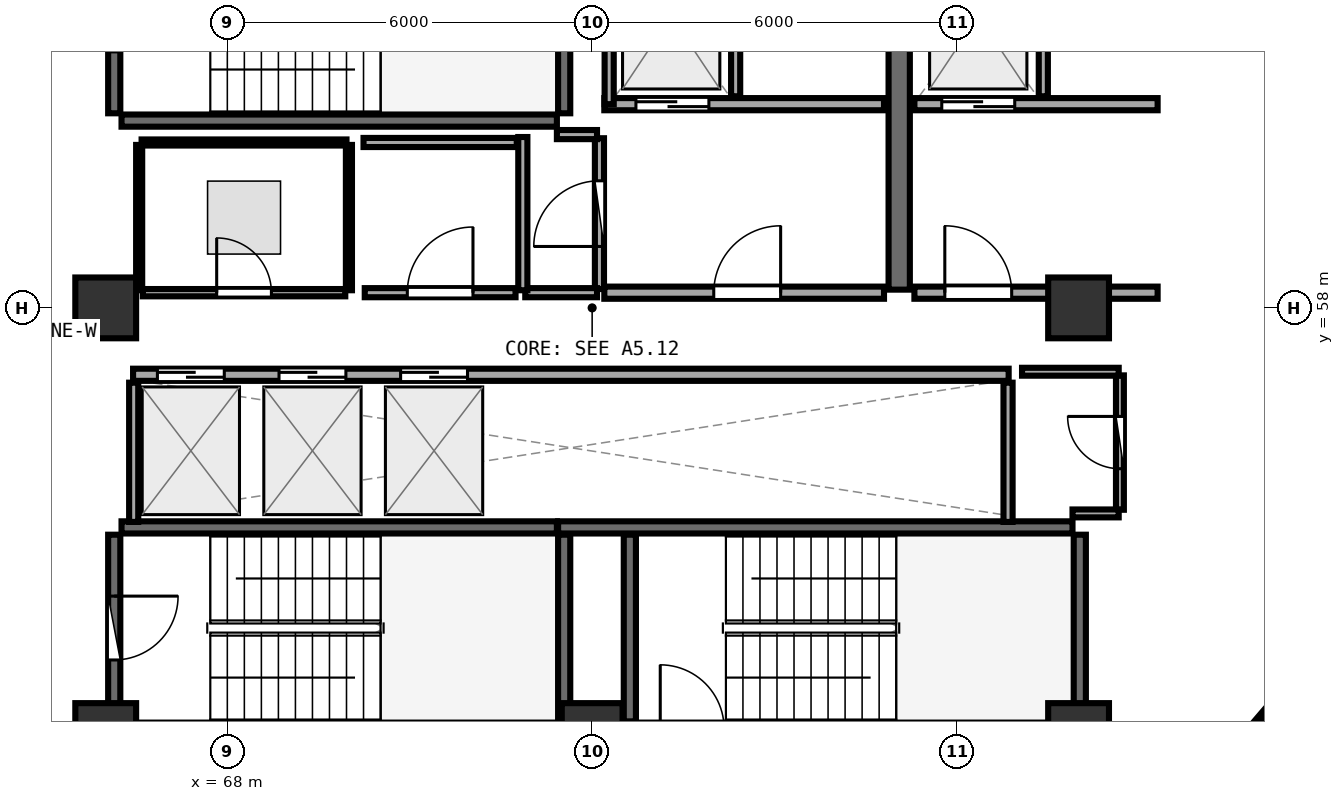
"""IFC4 building model, lengths in metres.
Left out: names, types, materials, properties, quantities, classifications, styles, units other than length and angle.
Written with IfcOpenShell. Run it as: python <this file> out.ifc"""

import sys

from ifc_helpers import new_model, si_unit, direction, frame, frame_2d, origin, origin_2d, place, context, subcontext, project, spatial, rectangle, extrude, element, fill, save


model = new_model("IFC4")
c1 = context("Model", 3, precision=1e-05, world=origin(), true_north=direction((0.0, 1.0)))
c2 = subcontext(c1, "Body", "Model", "MODEL_VIEW")
j1 = project(units=[si_unit("LENGTHUNIT", "METRE"), si_unit("PLANEANGLEUNIT", "RADIAN")], contexts=[c1])
p1 = place(None, origin())
s1 = spatial("IfcSite", under=j1, at=p1, CompositionType="ELEMENT")
p2 = place(p1, origin())
s2 = spatial("IfcBuilding", under=s1, at=p2, CompositionType="ELEMENT")
p3 = place(p2, frame((0.0, 0.0, 230.7)))
s3 = spatial("IfcBuildingStorey", under=s2, at=p3, CompositionType="ELEMENT", Elevation=230.7)
for number, where, z_axis, x_axis in (
    (1, (66.0, 51.0, 0.0), (0.0, 0.0, 1.0), (1.0, 0.0, 0.0)),
    (2, (74.0, 51.0, 0.0), (0.0, 0.0, 1.0), (1.0, 0.0, 0.0)),
    (3, (82.0, 51.0, 0.0), (0.0, 0.0, 1.0), (1.0, 0.0, 0.0)),
    (4, (82.0, 58.0, 0.0), (0.0, 0.0, 1.0), (1.0, 0.0, 0.0)),
    (5, (66.0, 58.0, 0.0), (0.0, 0.0, 1.0), (1.0, 0.0, 0.0)),
):
    element("IfcColumn", number, at=place(p3, frame(where, z_axis=z_axis, x_axis=x_axis)), inside=s3, PredefinedType="PILASTER", context=c2, shape_type="SweptSolid", body=[
        extrude(rectangle(XDim=1.0, YDim=1.0, at=origin_2d()), origin(), (0.0, 0.0, 1.0), 3.75),
    ])
p4 = place(p3, frame((66.26, 61.08, 0.0), z_axis=(0.0, 0.0, 1.0), x_axis=(1.0, 0.0, 0.0)))
e6 = element("IfcWall", 6, at=p4, inside=s3, PredefinedType="SHEAR", context=c2, shape_type="SweptSolid", body=[
    extrude(rectangle(XDim=7.16, YDim=0.2, at=frame_2d((3.58, 0.0))), origin(), (0.0, 0.0, 1.0), 3.49),
])
p5 = place(p3, frame((73.54, 61.2, 0.0), z_axis=(0.0, 0.0, 1.0), x_axis=(0.0, 1.0, 0.0)))
e7 = element("IfcWall", 7, at=p5, inside=s3, PredefinedType="SHEAR", context=c2, shape_type="SweptSolid", body=[
    extrude(rectangle(XDim=3.07, YDim=0.2, at=frame_2d((1.535, 0.0))), origin(), (0.0, 0.0, 1.0), 3.49),
])
p6 = place(p3, frame((66.14, 64.27, 0.0), z_axis=(0.0, 0.0, 1.0), x_axis=(0.0, -1.0, 0.0)))
e8 = element("IfcWall", 8, at=p6, inside=s3, PredefinedType="SHEAR", context=c2, shape_type="SweptSolid", body=[
    extrude(rectangle(XDim=3.07, YDim=0.2, at=frame_2d((1.535, 0.0))), origin(), (0.0, 0.0, 1.0), 3.49),
])
p7 = place(p6, frame((1.01, 0.0, 0.0)))
e9 = element("IfcOpeningElement", 9, at=p7, cuts=e8, PredefinedType="OPENING", context=c2, shape_type="SweptSolid", body=[
    extrude(rectangle(XDim=1.05, YDim=2.1, at=frame_2d((0.525, 1.05))), frame((0.0, 0.11, 0.0), z_axis=(0.0, -1.0, 0.0), x_axis=(1.0, 0.0, 0.0)), (0.0, 0.0, 1.0), 0.22),
])
p8 = place(p3, frame((82.02, 51.2, 0.0), z_axis=(0.0, 0.0, 1.0), x_axis=(0.0, 1.0, 0.0)))
e10 = element("IfcWall", 10, at=p8, inside=s3, PredefinedType="SHEAR", context=c2, shape_type="SweptSolid", body=[
    extrude(rectangle(XDim=3.07, YDim=0.2, at=frame_2d((1.535, 0.0))), origin(), (0.0, 0.0, 1.0), 3.49),
])
p9 = place(p3, frame((81.9, 54.39, 0.0), z_axis=(0.0, 0.0, 1.0), x_axis=(-1.0, 0.0, 0.0)))
e11 = element("IfcWall", 11, at=p9, inside=s3, PredefinedType="SHEAR", context=c2, shape_type="SweptSolid", body=[
    extrude(rectangle(XDim=8.46, YDim=0.2, at=frame_2d((4.23, 0.0))), origin(), (0.0, 0.0, 1.0), 3.49),
])
for number, where, z_axis, x_axis in (
    (12, (74.62, 54.27, 0.0), (0.0, 0.0, 1.0), (0.0, -1.0, 0.0)),
    (13, (73.54, 51.2, 0.0), (0.0, 0.0, 1.0), (0.0, 1.0, 0.0)),
):
    element("IfcWall", number, at=place(p3, frame(where, z_axis=z_axis, x_axis=x_axis)), inside=s3, PredefinedType="SHEAR", context=c2, shape_type="SweptSolid", body=[
        extrude(rectangle(XDim=3.07, YDim=0.2, at=frame_2d((1.535, 0.0))), origin(), (0.0, 0.0, 1.0), 3.49),
    ])
p10 = place(p3, frame((73.42, 54.39, 0.0), z_axis=(0.0, 0.0, 1.0), x_axis=(-1.0, 0.0, 0.0)))
e14 = element("IfcWall", 14, at=p10, inside=s3, PredefinedType="SHEAR", context=c2, shape_type="SweptSolid", body=[
    extrude(rectangle(XDim=7.16, YDim=0.2, at=frame_2d((3.58, 0.0))), origin(), (0.0, 0.0, 1.0), 3.49),
])
p11 = place(p3, frame((66.14, 54.27, 0.0), z_axis=(0.0, 0.0, 1.0), x_axis=(0.0, -1.0, 0.0)))
e15 = element("IfcWall", 15, at=p11, inside=s3, PredefinedType="SHEAR", context=c2, shape_type="SweptSolid", body=[
    extrude(rectangle(XDim=3.07, YDim=0.2, at=frame_2d((1.535, 0.0))), origin(), (0.0, 0.0, 1.0), 3.49),
])
p12 = place(p11, frame((1.01, 0.0, 0.0)))
e16 = element("IfcOpeningElement", 16, at=p12, cuts=e15, PredefinedType="OPENING", context=c2, shape_type="SweptSolid", body=[
    extrude(rectangle(XDim=1.05, YDim=2.1, at=frame_2d((0.525, 1.05))), frame((0.0, 0.11, 0.0), z_axis=(0.0, -1.0, 0.0), x_axis=(1.0, 0.0, 0.0)), (0.0, 0.0, 1.0), 0.22),
])
p13 = place(p3, frame((79.05, 58.3, 0.0), z_axis=(0.0, 0.0, 1.0), x_axis=(0.0, 1.0, 0.0)))
e17 = element("IfcWall", 17, at=p13, inside=s3, PredefinedType="SHEAR", context=c2, shape_type="SweptSolid", body=[
    extrude(rectangle(XDim=6.3, YDim=0.35, at=frame_2d((3.15, 0.0))), origin(), (0.0, 0.0, 1.0), 3.49),
])
p14 = place(p3, frame((74.2, 61.35, 0.0), z_axis=(0.0, 0.0, 1.0), x_axis=(1.0, 0.0, 0.0)))
e18 = element("IfcWall", 18, at=p14, inside=s3, PredefinedType="SOLIDWALL", context=c2, shape_type="SweptSolid", body=[
    extrude(rectangle(XDim=4.6, YDim=0.2, at=frame_2d((2.3, 0.0))), origin(), (0.0, 0.0, 1.0), 3.48),
])
p15 = place(p14, frame((0.52, 0.0, 0.0)))
e19 = element("IfcOpeningElement", 19, at=p15, cuts=e18, PredefinedType="OPENING", context=c2, shape_type="SweptSolid", body=[
    extrude(rectangle(XDim=1.2, YDim=2.15, at=frame_2d((0.6, 1.075))), frame((0.0, 0.11, 0.0), z_axis=(0.0, -1.0, 0.0), x_axis=(1.0, 0.0, 0.0)), (0.0, 0.0, 1.0), 0.22),
])
p16 = place(p3, frame((74.28, 61.35, 0.0), z_axis=(0.0, 0.0, 1.0), x_axis=(0.0, 1.0, 0.0)))
e20 = element("IfcWall", 20, at=p16, inside=s3, PredefinedType="PARTITIONING", context=c2, shape_type="SweptSolid", body=[
    extrude(rectangle(XDim=2.97, YDim=0.15, at=frame_2d((1.485, 0.0))), origin(), (0.0, 0.0, 1.0), 3.48),
])
p17 = place(p3, frame((76.36, 61.48, 0.0), z_axis=(0.0, 0.0, 1.0), x_axis=(0.0, 1.0, 0.0)))
e21 = element("IfcWall", 21, at=p17, inside=s3, PredefinedType="PARTITIONING", context=c2, shape_type="SweptSolid", body=[
    extrude(rectangle(XDim=2.84, YDim=0.15, at=frame_2d((1.42, 0.0))), origin(), (0.0, 0.0, 1.0), 3.48),
])
p18 = place(p3, frame((79.3, 61.35, 0.0), z_axis=(0.0, 0.0, 1.0), x_axis=(1.0, 0.0, 0.0)))
e22 = element("IfcWall", 22, at=p18, inside=s3, PredefinedType="SOLIDWALL", context=c2, shape_type="SweptSolid", body=[
    extrude(rectangle(XDim=4.0, YDim=0.2, at=frame_2d((2.0, 0.0))), origin(), (0.0, 0.0, 1.0), 2.775),
])
p19 = place(p18, frame((0.45, 0.0, 0.0)))
e23 = element("IfcOpeningElement", 23, at=p19, cuts=e22, PredefinedType="OPENING", context=c2, shape_type="SweptSolid", body=[
    extrude(rectangle(XDim=1.2, YDim=2.15, at=frame_2d((0.6, 1.075))), frame((0.0, 0.11, 0.0), z_axis=(0.0, -1.0, 0.0), x_axis=(1.0, 0.0, 0.0)), (0.0, 0.0, 1.0), 0.22),
])
p20 = place(p3, frame((81.42, 61.48, 0.0), z_axis=(0.0, 0.0, 1.0), x_axis=(0.0, 1.0, 0.0)))
e24 = element("IfcWall", 24, at=p20, inside=s3, PredefinedType="PARTITIONING", context=c2, shape_type="SweptSolid", body=[
    extrude(rectangle(XDim=2.84, YDim=0.15, at=frame_2d((1.42, 0.0))), origin(), (0.0, 0.0, 1.0), 3.48),
])
p21 = place(p3, frame((74.2, 58.25, 0.0), z_axis=(0.0, 0.0, 1.0), x_axis=(1.0, 0.0, 0.0)))
e25 = element("IfcWall", 25, at=p21, inside=s3, PredefinedType="SOLIDWALL", context=c2, shape_type="SweptSolid", body=[
    extrude(rectangle(XDim=4.6, YDim=0.2, at=frame_2d((2.3, 0.0))), origin(), (0.0, 0.0, 1.0), 3.48),
])
p22 = place(p21, frame((1.8, 0.0, 0.0)))
e26 = element("IfcOpeningElement", 26, at=p22, cuts=e25, PredefinedType="OPENING", context=c2, shape_type="SweptSolid", body=[
    extrude(rectangle(XDim=1.1, YDim=2.1, at=frame_2d((0.55, 1.05))), frame((0.0, 0.11, 0.0), z_axis=(0.0, -1.0, 0.0), x_axis=(1.0, 0.0, 0.0)), (0.0, 0.0, 1.0), 0.22),
])
p23 = place(p3, frame((79.3, 58.25, 0.0), z_axis=(0.0, 0.0, 1.0), x_axis=(1.0, 0.0, 0.0)))
e27 = element("IfcWall", 27, at=p23, inside=s3, PredefinedType="SOLIDWALL", context=c2, shape_type="SweptSolid", body=[
    extrude(rectangle(XDim=4.0, YDim=0.2, at=frame_2d((2.0, 0.0))), origin(), (0.0, 0.0, 1.0), 2.775),
])
p24 = place(p23, frame((0.5, 0.0, 0.0)))
e28 = element("IfcOpeningElement", 28, at=p24, cuts=e27, PredefinedType="OPENING", context=c2, shape_type="SweptSolid", body=[
    extrude(rectangle(XDim=1.1, YDim=2.1, at=frame_2d((0.55, 1.05))), frame((0.0, 0.11, 0.0), z_axis=(0.0, -1.0, 0.0), x_axis=(1.0, 0.0, 0.0)), (0.0, 0.0, 1.0), 0.22),
])
p25 = place(p3, frame((66.45, 56.9, 0.0), z_axis=(0.0, 0.0, 1.0), x_axis=(1.0, 0.0, 0.0)))
e29 = element("IfcWall", 29, at=p25, inside=s3, PredefinedType="SOLIDWALL", context=c2, shape_type="SweptSolid", body=[
    extrude(rectangle(XDim=14.4, YDim=0.2, at=frame_2d((7.2, 0.0))), origin(), (0.0, 0.0, 1.0), 3.48),
])
p26 = place(p25, frame((0.4, 0.0, 0.0)))
e30 = element("IfcOpeningElement", 30, at=p26, cuts=e29, PredefinedType="OPENING", context=c2, shape_type="SweptSolid", body=[
    extrude(rectangle(XDim=1.1, YDim=2.1, at=frame_2d((0.55, 1.05))), frame((0.0, 0.11, 0.0), z_axis=(0.0, -1.0, 0.0), x_axis=(1.0, 0.0, 0.0)), (0.0, 0.0, 1.0), 0.22),
])
p27 = place(p25, frame((2.4, 0.0, 0.0)))
e31 = element("IfcOpeningElement", 31, at=p27, cuts=e29, PredefinedType="OPENING", context=c2, shape_type="SweptSolid", body=[
    extrude(rectangle(XDim=1.1, YDim=2.1, at=frame_2d((0.55, 1.05))), frame((0.0, 0.11, 0.0), z_axis=(0.0, -1.0, 0.0), x_axis=(1.0, 0.0, 0.0)), (0.0, 0.0, 1.0), 0.22),
])
p28 = place(p25, frame((4.4, 0.0, 0.0)))
e32 = element("IfcOpeningElement", 32, at=p28, cuts=e29, PredefinedType="OPENING", context=c2, shape_type="SweptSolid", body=[
    extrude(rectangle(XDim=1.1, YDim=2.1, at=frame_2d((0.55, 1.05))), frame((0.0, 0.11, 0.0), z_axis=(0.0, -1.0, 0.0), x_axis=(1.0, 0.0, 0.0)), (0.0, 0.0, 1.0), 0.22),
])
for number, where, z_axis, x_axis in (
    (33, (66.46, 54.48, 0.0), (0.0, 0.0, 1.0), (0.0, 1.0, 0.0)),
    (34, (80.84, 54.48, 0.0), (0.0, 0.0, 1.0), (0.0, 1.0, 0.0)),
):
    element("IfcWall", number, at=place(p3, frame(where, z_axis=z_axis, x_axis=x_axis)), inside=s3, PredefinedType="PARTITIONING", context=c2, shape_type="SweptSolid", body=[
        extrude(rectangle(XDim=2.29, YDim=0.15, at=frame_2d((1.145, 0.0))), origin(), (0.0, 0.0, 1.0), 3.48),
    ])
p29 = place(p3, frame((74.12, 58.31, 0.0), z_axis=(0.0, 0.0, 1.0), x_axis=(0.0, 1.0, 0.0)))
e35 = element("IfcWall", 35, at=p29, inside=s3, PredefinedType="PARTITIONING", context=c2, shape_type="SweptSolid", body=[
    extrude(rectangle(XDim=2.48, YDim=0.15, at=frame_2d((1.24, 0.0))), origin(), (0.0, 0.0, 1.0), 3.48),
])
p30 = place(p29, frame((0.7, 0.0, 0.0)))
e36 = element("IfcOpeningElement", 36, at=p30, cuts=e35, PredefinedType="OPENING", context=c2, shape_type="SweptSolid", body=[
    extrude(rectangle(XDim=1.08, YDim=2.1, at=frame_2d((0.54, 1.05))), frame((0.0, 0.085, 0.0), z_axis=(0.0, -1.0, 0.0), x_axis=(1.0, 0.0, 0.0)), (0.0, 0.0, 1.0), 0.17),
])
p31 = place(p3, frame((82.68, 54.68, 0.0), z_axis=(0.0, 0.0, 1.0), x_axis=(0.0, 1.0, 0.0)))
e37 = element("IfcWall", 37, at=p31, inside=s3, PredefinedType="PLUMBINGWALL", context=c2, shape_type="SweptSolid", body=[
    extrude(rectangle(XDim=2.21, YDim=0.13, at=frame_2d((1.105, 0.0))), origin(), (0.0, 0.0, 1.0), 3.48),
])
p32 = place(p31, frame((0.675, 0.0, 0.0)))
e38 = element("IfcOpeningElement", 38, at=p32, cuts=e37, PredefinedType="OPENING", context=c2, shape_type="SweptSolid", body=[
    extrude(rectangle(XDim=0.86, YDim=2.05, at=frame_2d((0.43, 1.025))), frame((0.0, 0.075, 0.0), z_axis=(0.0, -1.0, 0.0), x_axis=(1.0, 0.0, 0.0)), (0.0, 0.0, 1.0), 0.15),
])
p33 = place(p3, frame((66.61, 58.25, 0.0), z_axis=(0.0, 0.0, 1.0), x_axis=(1.0, 0.0, 0.0)))
e39 = element("IfcWall", 39, at=p33, inside=s3, PredefinedType="PARTITIONING", context=c2, shape_type="SweptSolid", body=[
    extrude(rectangle(XDim=3.33, YDim=0.12, at=frame_2d((1.665, 0.0))), origin(), (0.0, 0.0, 1.0), 3.48),
])
p34 = place(p33, frame((1.215, 0.0, 0.0)))
e40 = element("IfcOpeningElement", 40, at=p34, cuts=e39, PredefinedType="OPENING", context=c2, shape_type="SweptSolid", body=[
    extrude(rectangle(XDim=0.9, YDim=2.08, at=frame_2d((0.45, 1.04))), frame((0.0, 0.07, 0.0), z_axis=(0.0, -1.0, 0.0), x_axis=(1.0, 0.0, 0.0)), (0.0, 0.0, 1.0), 0.14),
])
p35 = place(p3, frame((70.26, 58.25, 0.0), z_axis=(0.0, 0.0, 1.0), x_axis=(1.0, 0.0, 0.0)))
e41 = element("IfcWall", 41, at=p35, inside=s3, PredefinedType="PARTITIONING", context=c2, shape_type="SweptSolid", body=[
    extrude(rectangle(XDim=2.48, YDim=0.15, at=frame_2d((1.24, 0.0))), origin(), (0.0, 0.0, 1.0), 3.48),
])
p36 = place(p35, frame((0.7, 0.0, 0.0)))
e42 = element("IfcOpeningElement", 42, at=p36, cuts=e41, PredefinedType="OPENING", context=c2, shape_type="SweptSolid", body=[
    extrude(rectangle(XDim=1.08, YDim=2.1, at=frame_2d((0.54, 1.05))), frame((0.0, 0.085, 0.0), z_axis=(0.0, -1.0, 0.0), x_axis=(1.0, 0.0, 0.0)), (0.0, 0.0, 1.0), 0.17),
])
p37 = place(p3, frame((72.9, 58.25, 0.0), z_axis=(0.0, 0.0, 1.0), x_axis=(1.0, 0.0, 0.0)))
e43 = element("IfcWall", 43, at=p37, inside=s3, PredefinedType="PARTITIONING", context=c2, shape_type="SweptSolid", body=[
    extrude(rectangle(XDim=1.18, YDim=0.15, at=frame_2d((0.59, 0.0))), origin(), (0.0, 0.0, 1.0), 3.48),
])
p38 = place(p3, frame((74.08, 60.85, 0.0), z_axis=(0.0, 0.0, 1.0), x_axis=(-1.0, 0.0, 0.0)))
e44 = element("IfcWall", 44, at=p38, inside=s3, PredefinedType="PARTITIONING", context=c2, shape_type="SweptSolid", body=[
    extrude(rectangle(XDim=0.66, YDim=0.15, at=frame_2d((0.33, 0.0))), origin(), (0.0, 0.0, 1.0), 3.48),
])
p39 = place(p3, frame((72.86, 60.81, 0.0), z_axis=(0.0, 0.0, 1.0), x_axis=(0.0, -1.0, 0.0)))
e45 = element("IfcWall", 45, at=p39, inside=s3, PredefinedType="PARTITIONING", context=c2, shape_type="SweptSolid", body=[
    extrude(rectangle(XDim=2.52, YDim=0.15, at=frame_2d((1.26, 0.0))), origin(), (0.0, 0.0, 1.0), 3.48),
])
p40 = place(p3, frame((81.9, 54.62, 0.0), z_axis=(0.0, 0.0, 1.0), x_axis=(1.0, 0.0, 0.0)))
e46 = element("IfcWall", 46, at=p40, inside=s3, PredefinedType="PLUMBINGWALL", context=c2, shape_type="SweptSolid", body=[
    extrude(rectangle(XDim=0.76, YDim=0.13, at=frame_2d((0.38, 0.0))), origin(), (0.0, 0.0, 1.0), 2.775),
])
p41 = place(p3, frame((82.66, 56.95, 0.0), z_axis=(0.0, 0.0, 1.0), x_axis=(-1.0, 0.0, 0.0)))
e47 = element("IfcWall", 47, at=p41, inside=s3, PredefinedType="PLUMBINGWALL", context=c2, shape_type="SweptSolid", body=[
    extrude(rectangle(XDim=1.59, YDim=0.13, at=frame_2d((0.795, 0.0))), origin(), (0.0, 0.0, 1.0), 2.775),
])
p42 = place(p3, frame((70.0, 58.29, 0.0), z_axis=(0.0, 0.0, 1.0), x_axis=(0.0, 1.0, 0.0)))
e48 = element("IfcWall", 48, at=p42, inside=s3, PredefinedType="PARTITIONING", context=c2, shape_type="SweptSolid", body=[
    extrude(rectangle(XDim=2.39, YDim=0.1, at=frame_2d((1.195, 0.0))), origin(), (0.0, 0.0, 1.0), 3.48),
])
p43 = place(p3, frame((69.96, 60.72, 0.0), z_axis=(0.0, 0.0, 1.0), x_axis=(-1.0, 0.0, 0.0)))
e49 = element("IfcWall", 49, at=p43, inside=s3, PredefinedType="PARTITIONING", context=c2, shape_type="SweptSolid", body=[
    extrude(rectangle(XDim=3.37, YDim=0.1, at=frame_2d((1.685, 0.0))), origin(), (0.0, 0.0, 1.0), 3.48),
])
p44 = place(p3, frame((66.55, 60.68, 0.0), z_axis=(0.0, 0.0, 1.0), x_axis=(0.0, -1.0, 0.0)))
e50 = element("IfcWall", 50, at=p44, inside=s3, PredefinedType="PARTITIONING", context=c2, shape_type="SweptSolid", body=[
    extrude(rectangle(XDim=2.39, YDim=0.1, at=frame_2d((1.195, 0.0))), origin(), (0.0, 0.0, 1.0), 3.48),
])
p45 = place(p3, frame((72.76, 60.72, 0.0), z_axis=(0.0, 0.0, 1.0), x_axis=(-1.0, 0.0, 0.0)))
e51 = element("IfcWall", 51, at=p45, inside=s3, PredefinedType="PARTITIONING", context=c2, shape_type="SweptSolid", body=[
    extrude(rectangle(XDim=2.52, YDim=0.15, at=frame_2d((1.26, 0.0))), origin(), (0.0, 0.0, 1.0), 3.48),
])
p46 = place(p3, frame((82.488, 48.32, 0.0), z_axis=(0.0, 0.0, 1.0), x_axis=(0.650415654335, 0.759578486133, 0.0)))
e52 = element("IfcWall", 52, at=p46, inside=s3, PredefinedType="PARTITIONING", context=c2, shape_type="SweptSolid", body=[
    extrude(rectangle(XDim=6.316, YDim=0.1, at=frame_2d((3.158, 0.0))), origin(), (0.0, 0.0, 1.0), 3.025),
])
p47 = place(p12, origin())
e53 = element("IfcDoor", 53, at=p47, inside=s3, OperationType="SINGLE_SWING_LEFT", PredefinedType="DOOR", context=c2, shape_type="SweptSolid", body=[
    extrude(rectangle(XDim=1.05, YDim=2.1, at=frame_2d((0.525, 1.05))), frame((0.0, 0.025, 0.0), z_axis=(0.0, -1.0, 0.0), x_axis=(1.0, 0.0, 0.0)), (0.0, 0.0, 1.0), 0.05),
])
fill(e16, e53)
p48 = place(p15, origin())
e54 = element("IfcDoor", 54, at=p48, inside=s3, OperationType="DOUBLE_DOOR_SLIDING", PredefinedType="DOOR", context=c2, shape_type="SweptSolid", body=[
    extrude(rectangle(XDim=1.2, YDim=2.15, at=frame_2d((0.6, 1.075))), frame((0.0, 0.025, 0.0), z_axis=(0.0, -1.0, 0.0), x_axis=(1.0, 0.0, 0.0)), (0.0, 0.0, 1.0), 0.05),
])
fill(e19, e54)
p49 = place(p19, origin())
e55 = element("IfcDoor", 55, at=p49, inside=s3, OperationType="DOUBLE_DOOR_SLIDING", PredefinedType="DOOR", context=c2, shape_type="SweptSolid", body=[
    extrude(rectangle(XDim=1.2, YDim=2.15, at=frame_2d((0.6, 1.075))), frame((0.0, 0.025, 0.0), z_axis=(0.0, -1.0, 0.0), x_axis=(1.0, 0.0, 0.0)), (0.0, 0.0, 1.0), 0.05),
])
fill(e23, e55)
p50 = place(p22, frame((1.1, 0.0, 0.0), z_axis=(0.0, 0.0, 1.0), x_axis=(-1.0, 0.0, 0.0)))
e56 = element("IfcDoor", 56, at=p50, inside=s3, OperationType="SINGLE_SWING_LEFT", PredefinedType="DOOR", context=c2, shape_type="SweptSolid", body=[
    extrude(rectangle(XDim=1.1, YDim=2.1, at=frame_2d((0.55, 1.05))), frame((0.0, 0.025, 0.0), z_axis=(0.0, -1.0, 0.0), x_axis=(1.0, 0.0, 0.0)), (0.0, 0.0, 1.0), 0.05),
])
fill(e26, e56)
p51 = place(p24, frame((1.1, 0.0, 0.0), z_axis=(0.0, 0.0, 1.0), x_axis=(-1.0, 0.0, 0.0)))
e57 = element("IfcDoor", 57, at=p51, inside=s3, OperationType="SINGLE_SWING_RIGHT", PredefinedType="DOOR", context=c2, shape_type="SweptSolid", body=[
    extrude(rectangle(XDim=1.1, YDim=2.1, at=frame_2d((0.55, 1.05))), frame((0.0, 0.025, 0.0), z_axis=(0.0, -1.0, 0.0), x_axis=(1.0, 0.0, 0.0)), (0.0, 0.0, 1.0), 0.05),
])
fill(e28, e57)
p52 = place(p26, origin())
e58 = element("IfcDoor", 58, at=p52, inside=s3, OperationType="DOUBLE_DOOR_SLIDING", PredefinedType="DOOR", context=c2, shape_type="SweptSolid", body=[
    extrude(rectangle(XDim=1.1, YDim=2.1, at=frame_2d((0.55, 1.05))), frame((0.0, 0.025, 0.0), z_axis=(0.0, -1.0, 0.0), x_axis=(1.0, 0.0, 0.0)), (0.0, 0.0, 1.0), 0.05),
])
fill(e30, e58)
p53 = place(p27, origin())
e59 = element("IfcDoor", 59, at=p53, inside=s3, OperationType="DOUBLE_DOOR_SLIDING", PredefinedType="DOOR", context=c2, shape_type="SweptSolid", body=[
    extrude(rectangle(XDim=1.1, YDim=2.1, at=frame_2d((0.55, 1.05))), frame((0.0, 0.025, 0.0), z_axis=(0.0, -1.0, 0.0), x_axis=(1.0, 0.0, 0.0)), (0.0, 0.0, 1.0), 0.05),
])
fill(e31, e59)
p54 = place(p28, origin())
e60 = element("IfcDoor", 60, at=p54, inside=s3, OperationType="DOUBLE_DOOR_SLIDING", PredefinedType="DOOR", context=c2, shape_type="SweptSolid", body=[
    extrude(rectangle(XDim=1.1, YDim=2.1, at=frame_2d((0.55, 1.05))), frame((0.0, 0.025, 0.0), z_axis=(0.0, -1.0, 0.0), x_axis=(1.0, 0.0, 0.0)), (0.0, 0.0, 1.0), 0.05),
])
fill(e32, e60)
p55 = place(p30, origin())
e61 = element("IfcDoor", 61, at=p55, inside=s3, OperationType="SINGLE_SWING_LEFT", PredefinedType="DOOR", context=c2, shape_type="SweptSolid", body=[
    extrude(rectangle(XDim=1.08, YDim=2.1, at=frame_2d((0.54, 1.05))), frame((0.0, 0.025, 0.0), z_axis=(0.0, -1.0, 0.0), x_axis=(1.0, 0.0, 0.0)), (0.0, 0.0, 1.0), 0.05),
])
fill(e36, e61)
p56 = place(p32, origin())
e62 = element("IfcDoor", 62, at=p56, inside=s3, OperationType="SINGLE_SWING_RIGHT", PredefinedType="DOOR", context=c2, shape_type="SweptSolid", body=[
    extrude(rectangle(XDim=0.86, YDim=2.05, at=frame_2d((0.43, 1.025))), frame((0.0, 0.025, 0.0), z_axis=(0.0, -1.0, 0.0), x_axis=(1.0, 0.0, 0.0)), (0.0, 0.0, 1.0), 0.05),
])
fill(e38, e62)
p57 = place(p34, origin())
e63 = element("IfcDoor", 63, at=p57, inside=s3, OperationType="SINGLE_SWING_LEFT", PredefinedType="DOOR", context=c2, shape_type="SweptSolid", body=[
    extrude(rectangle(XDim=0.9, YDim=2.08, at=frame_2d((0.45, 1.04))), frame((0.0, 0.025, 0.0), z_axis=(0.0, -1.0, 0.0), x_axis=(1.0, 0.0, 0.0)), (0.0, 0.0, 1.0), 0.05),
])
fill(e40, e63)
p58 = place(p36, origin())
e64 = element("IfcDoor", 64, at=p58, inside=s3, OperationType="SINGLE_SWING_RIGHT", PredefinedType="DOOR", context=c2, shape_type="SweptSolid", body=[
    extrude(rectangle(XDim=1.08, YDim=2.1, at=frame_2d((0.54, 1.05))), frame((0.0, 0.025, 0.0), z_axis=(0.0, -1.0, 0.0), x_axis=(1.0, 0.0, 0.0)), (0.0, 0.0, 1.0), 0.05),
])
fill(e42, e64)
save(model, sys.argv[1])
